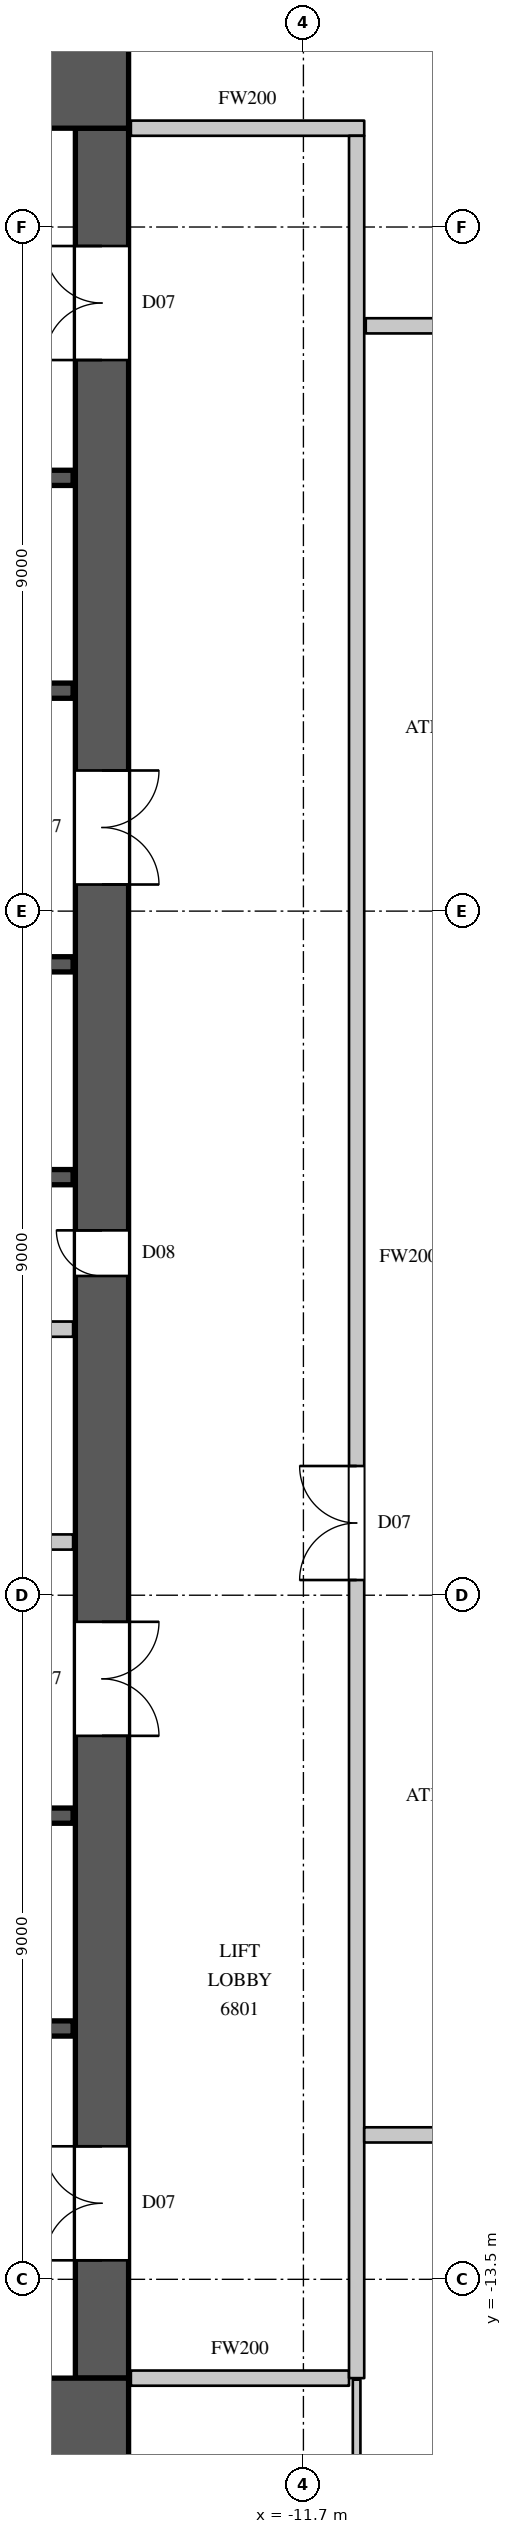
"""IFC4 building model, lengths in metres.
Left out: names, types, materials, properties, quantities, classifications, styles, units other than length and angle.
Written with IfcOpenShell. Run it as: python <this file> out.ifc"""

import sys

from ifc_helpers import new_model, si_unit, direction, frame, frame_2d, origin, place, context, subcontext, project, spatial, rectangle, extrude, element, fill, save


model = new_model("IFC4")
c1 = context("Model", 3, precision=1e-05, world=origin(), true_north=direction((0.0, 1.0)))
c2 = subcontext(c1, "Body", "Model", "MODEL_VIEW")
j1 = project(units=[si_unit("LENGTHUNIT", "METRE"), si_unit("PLANEANGLEUNIT", "RADIAN")], contexts=[c1])
p1 = place(None, origin())
s1 = spatial("IfcSite", under=j1, at=p1, CompositionType="ELEMENT")
p2 = place(p1, origin())
s2 = spatial("IfcBuilding", under=s1, at=p2, CompositionType="ELEMENT")
p3 = place(p2, frame((0.0, 0.0, 300.8)))
s3 = spatial("IfcBuildingStorey", under=s2, at=p3, CompositionType="ELEMENT", Elevation=300.8)
for number, where, z_axis, x_axis in (
    (1, (-30.0, 15.4, 0.0), (0.0, 0.0, 1.0), (1.0, 0.0, 0.0)),
    (2, (-30.0, -15.4, 0.0), (0.0, 0.0, 1.0), (1.0, 0.0, 0.0)),
):
    element("IfcWall", number, at=place(p3, frame(where, z_axis=z_axis, x_axis=x_axis)), inside=s3, PredefinedType="SHEAR", context=c2, shape_type="SweptSolid", body=[
        extrude(rectangle(XDim=16.0, YDim=1.2, at=frame_2d((8.0, 0.0))), origin(), (0.0, 0.0, 1.0), 4.1),
    ])
p4 = place(p3, frame((-14.35, -14.8, 0.0), z_axis=(0.0, 0.0, 1.0), x_axis=(0.0, 1.0, 0.0)))
e3 = element("IfcWall", 3, at=p4, inside=s3, PredefinedType="SHEAR", context=c2, shape_type="SweptSolid", body=[
    extrude(rectangle(XDim=29.6, YDim=0.7, at=frame_2d((14.8, 0.0))), origin(), (0.0, 0.0, 1.0), 4.1),
])
p5 = place(p4, frame((1.55, 0.0, 0.0)))
e4 = element("IfcOpeningElement", 4, at=p5, cuts=e3, PredefinedType="OPENING", context=c2, shape_type="SweptSolid", body=[
    extrude(rectangle(XDim=1.5, YDim=2.4, at=frame_2d((0.75, 1.2))), frame((0.0, 0.36, 0.0), z_axis=(0.0, -1.0, 0.0), x_axis=(1.0, 0.0, 0.0)), (0.0, 0.0, 1.0), 0.72),
])
p6 = place(p4, frame((26.55, 0.0, 0.0)))
e5 = element("IfcOpeningElement", 5, at=p6, cuts=e3, PredefinedType="OPENING", context=c2, shape_type="SweptSolid", body=[
    extrude(rectangle(XDim=1.5, YDim=2.4, at=frame_2d((0.75, 1.2))), frame((0.0, 0.36, 0.0), z_axis=(0.0, -1.0, 0.0), x_axis=(1.0, 0.0, 0.0)), (0.0, 0.0, 1.0), 0.72),
])
p7 = place(p4, frame((8.45, 0.0, 0.0)))
e6 = element("IfcOpeningElement", 6, at=p7, cuts=e3, PredefinedType="OPENING", context=c2, shape_type="SweptSolid", body=[
    extrude(rectangle(XDim=1.5, YDim=2.4, at=frame_2d((0.75, 1.2))), frame((0.0, 0.36, 0.0), z_axis=(0.0, -1.0, 0.0), x_axis=(1.0, 0.0, 0.0)), (0.0, 0.0, 1.0), 0.72),
])
p8 = place(p4, frame((19.65, 0.0, 0.0)))
e7 = element("IfcOpeningElement", 7, at=p8, cuts=e3, PredefinedType="OPENING", context=c2, shape_type="SweptSolid", body=[
    extrude(rectangle(XDim=1.5, YDim=2.4, at=frame_2d((0.75, 1.2))), frame((0.0, 0.36, 0.0), z_axis=(0.0, -1.0, 0.0), x_axis=(1.0, 0.0, 0.0)), (0.0, 0.0, 1.0), 0.72),
])
p9 = place(p4, frame((14.5, 0.0, 0.0)))
e8 = element("IfcOpeningElement", 8, at=p9, cuts=e3, PredefinedType="OPENING", context=c2, shape_type="SweptSolid", body=[
    extrude(rectangle(XDim=0.6, YDim=2.0, at=frame_2d((0.3, 1.0))), frame((0.0, 0.36, 0.0), z_axis=(0.0, -1.0, 0.0), x_axis=(1.0, 0.0, 0.0)), (0.0, 0.0, 1.0), 0.72),
])
p10 = place(p3, frame((-29.27, -3.8, 0.0), z_axis=(0.0, 0.0, 1.0), x_axis=(1.0, 0.0, 0.0)))
e9 = element("IfcWall", 9, at=p10, inside=s3, PredefinedType="PARTITIONING", context=c2, shape_type="SweptSolid", body=[
    extrude(rectangle(XDim=14.54, YDim=0.2, at=frame_2d((7.27, 0.0))), origin(), (0.0, 0.0, 1.0), 3.8),
])
p11 = place(p10, frame((3.25, 0.0, 0.0)))
e10 = element("IfcOpeningElement", 10, at=p11, cuts=e9, PredefinedType="OPENING", context=c2, shape_type="SweptSolid", body=[
    extrude(rectangle(XDim=0.9, YDim=2.2, at=frame_2d((0.45, 1.1))), frame((0.0, 0.11, 0.0), z_axis=(0.0, -1.0, 0.0), x_axis=(1.0, 0.0, 0.0)), (0.0, 0.0, 1.0), 0.22),
])
p12 = place(p10, frame((10.35, 0.0, 0.0)))
e11 = element("IfcOpeningElement", 11, at=p12, cuts=e9, PredefinedType="OPENING", context=c2, shape_type="SweptSolid", body=[
    extrude(rectangle(XDim=0.9, YDim=2.2, at=frame_2d((0.45, 1.1))), frame((0.0, 0.11, 0.0), z_axis=(0.0, -1.0, 0.0), x_axis=(1.0, 0.0, 0.0)), (0.0, 0.0, 1.0), 0.22),
])
p13 = place(p3, frame((-13.97, -14.8, 0.0), z_axis=(0.0, 0.0, 1.0), x_axis=(1.0, 0.0, 0.0)))
e12 = element("IfcWall", 12, at=p13, inside=s3, PredefinedType="PARTITIONING", context=c2, shape_type="SweptSolid", body=[
    extrude(rectangle(XDim=2.87, YDim=0.2, at=frame_2d((1.435, 0.0))), origin(), (0.0, 0.0, 1.0), 3.8),
])
p14 = place(p3, frame((-13.97, 14.8, 0.0), z_axis=(0.0, 0.0, 1.0), x_axis=(1.0, 0.0, 0.0)))
e13 = element("IfcWall", 13, at=p14, inside=s3, PredefinedType="PARTITIONING", context=c2, shape_type="SweptSolid", body=[
    extrude(rectangle(XDim=3.07, YDim=0.2, at=frame_2d((1.535, 0.0))), origin(), (0.0, 0.0, 1.0), 3.8),
])
p15 = place(p3, frame((-11.0, -14.8, 0.0), z_axis=(0.0, 0.0, 1.0), x_axis=(0.0, 1.0, 0.0)))
e14 = element("IfcWall", 14, at=p15, inside=s3, PredefinedType="PARTITIONING", context=c2, shape_type="SweptSolid", body=[
    extrude(rectangle(XDim=29.5, YDim=0.2, at=frame_2d((14.75, 0.0))), origin(), (0.0, 0.0, 1.0), 3.8),
])
p16 = place(p15, frame((10.5, 0.0, 0.0)))
e15 = element("IfcOpeningElement", 15, at=p16, cuts=e14, PredefinedType="OPENING", context=c2, shape_type="SweptSolid", body=[
    extrude(rectangle(XDim=1.5, YDim=2.4, at=frame_2d((0.75, 1.2))), frame((0.0, 0.11, 0.0), z_axis=(0.0, -1.0, 0.0), x_axis=(1.0, 0.0, 0.0)), (0.0, 0.0, 1.0), 0.22),
])
p17 = place(p3, frame((-10.9, -11.6, 0.0), z_axis=(0.0, 0.0, 1.0), x_axis=(1.0, 0.0, 0.0)))
e16 = element("IfcWall", 16, at=p17, inside=s3, PredefinedType="PARTITIONING", context=c2, shape_type="SweptSolid", body=[
    extrude(rectangle(XDim=13.421, YDim=0.2, at=frame_2d((6.71, 0.0))), origin(), (0.0, 0.0, 1.0), 3.8),
])
p18 = place(p17, frame((1.1, 0.0, 0.0)))
e17 = element("IfcOpeningElement", 17, at=p18, cuts=e16, PredefinedType="OPENING", context=c2, shape_type="SweptSolid", body=[
    extrude(rectangle(XDim=0.9, YDim=2.2, at=frame_2d((0.45, 1.1))), frame((0.0, 0.11, 0.0), z_axis=(0.0, -1.0, 0.0), x_axis=(1.0, 0.0, 0.0)), (0.0, 0.0, 1.0), 0.22),
])
p19 = place(p17, frame((4.9, 0.0, 0.0)))
e18 = element("IfcOpeningElement", 18, at=p19, cuts=e16, PredefinedType="OPENING", context=c2, shape_type="SweptSolid", body=[
    extrude(rectangle(XDim=0.9, YDim=2.2, at=frame_2d((0.45, 1.1))), frame((0.0, 0.11, 0.0), z_axis=(0.0, -1.0, 0.0), x_axis=(1.0, 0.0, 0.0)), (0.0, 0.0, 1.0), 0.22),
])
p20 = place(p17, frame((7.25, 0.0, 0.0)))
e19 = element("IfcOpeningElement", 19, at=p20, cuts=e16, PredefinedType="OPENING", context=c2, shape_type="SweptSolid", body=[
    extrude(rectangle(XDim=0.9, YDim=2.2, at=frame_2d((0.45, 1.1))), frame((0.0, 0.11, 0.0), z_axis=(0.0, -1.0, 0.0), x_axis=(1.0, 0.0, 0.0)), (0.0, 0.0, 1.0), 0.22),
])
p21 = place(p17, frame((9.9, 0.0, 0.0)))
e20 = element("IfcOpeningElement", 20, at=p21, cuts=e16, PredefinedType="OPENING", context=c2, shape_type="SweptSolid", body=[
    extrude(rectangle(XDim=1.1, YDim=2.4, at=frame_2d((0.55, 1.2))), frame((0.0, 0.11, 0.0), z_axis=(0.0, -1.0, 0.0), x_axis=(1.0, 0.0, 0.0)), (0.0, 0.0, 1.0), 0.22),
])
p22 = place(p3, frame((-10.88, 12.2, 0.0), z_axis=(0.0, 0.0, 1.0), x_axis=(1.0, 0.0, 0.0)))
e21 = element("IfcWall", 21, at=p22, inside=s3, PredefinedType="PARTITIONING", context=c2, shape_type="SweptSolid", body=[
    extrude(rectangle(XDim=3.736, YDim=0.2, at=frame_2d((1.868, 0.0))), origin(), (0.0, 0.0, 1.0), 3.8),
])
p23 = place(p22, frame((1.9, 0.0, 0.0)))
e22 = element("IfcOpeningElement", 22, at=p23, cuts=e21, PredefinedType="OPENING", context=c2, shape_type="SweptSolid", body=[
    extrude(rectangle(XDim=1.1, YDim=2.4, at=frame_2d((0.55, 1.2))), frame((0.0, 0.11, 0.0), z_axis=(0.0, -1.0, 0.0), x_axis=(1.0, 0.0, 0.0)), (0.0, 0.0, 1.0), 0.22),
])
p24 = place(p3, frame((-29.27, -1.0, 0.0), z_axis=(0.0, 0.0, 1.0), x_axis=(1.0, 0.0, 0.0)))
e23 = element("IfcWall", 23, at=p24, inside=s3, PredefinedType="PARTITIONING", context=c2, shape_type="SweptSolid", body=[
    extrude(rectangle(XDim=14.54, YDim=0.2, at=frame_2d((7.27, 0.0))), origin(), (0.0, 0.0, 1.0), 3.8),
])
p25 = place(p3, frame((-17.92, -10.2, 0.0), z_axis=(0.0, 0.0, 1.0), x_axis=(1.0, 0.0, 0.0)))
e24 = element("IfcWall", 24, at=p25, inside=s3, PredefinedType="SHEAR", context=c2, shape_type="SweptSolid", body=[
    extrude(rectangle(XDim=3.19, YDim=0.2, at=frame_2d((1.595, 0.0))), origin(), (0.0, 0.0, 1.0), 3.8),
])
p26 = place(p25, frame((1.05, 0.0, 0.0)))
e25 = element("IfcOpeningElement", 25, at=p26, cuts=e24, PredefinedType="OPENING", context=c2, shape_type="SweptSolid", body=[
    extrude(rectangle(XDim=1.1, YDim=2.2, at=frame_2d((0.55, 1.1))), frame((0.0, 0.11, 0.0), z_axis=(0.0, -1.0, 0.0), x_axis=(1.0, 0.0, 0.0)), (0.0, 0.0, 1.0), 0.22),
])
p27 = place(p3, frame((-17.92, -7.4, 0.0), z_axis=(0.0, 0.0, 1.0), x_axis=(1.0, 0.0, 0.0)))
e26 = element("IfcWall", 26, at=p27, inside=s3, PredefinedType="SHEAR", context=c2, shape_type="SweptSolid", body=[
    extrude(rectangle(XDim=3.19, YDim=0.2, at=frame_2d((1.595, 0.0))), origin(), (0.0, 0.0, 1.0), 3.8),
])
p28 = place(p3, frame((-17.9, 1.0, 0.0), z_axis=(0.0, 0.0, 1.0), x_axis=(1.0, 0.0, 0.0)))
e27 = element("IfcWall", 27, at=p28, inside=s3, PredefinedType="SHEAR", context=c2, shape_type="SweptSolid", body=[
    extrude(rectangle(XDim=3.17, YDim=0.2, at=frame_2d((1.585, 0.0))), origin(), (0.0, 0.0, 1.0), 3.8),
])
p29 = place(p3, frame((-17.9, 3.8, 0.0), z_axis=(0.0, 0.0, 1.0), x_axis=(1.0, 0.0, 0.0)))
e28 = element("IfcWall", 28, at=p29, inside=s3, PredefinedType="SHEAR", context=c2, shape_type="SweptSolid", body=[
    extrude(rectangle(XDim=3.17, YDim=0.2, at=frame_2d((1.585, 0.0))), origin(), (0.0, 0.0, 1.0), 3.8),
])
p30 = place(p29, frame((1.05, 0.0, 0.0)))
e29 = element("IfcOpeningElement", 29, at=p30, cuts=e28, PredefinedType="OPENING", context=c2, shape_type="SweptSolid", body=[
    extrude(rectangle(XDim=1.1, YDim=2.2, at=frame_2d((0.55, 1.1))), frame((0.0, 0.11, 0.0), z_axis=(0.0, -1.0, 0.0), x_axis=(1.0, 0.0, 0.0)), (0.0, 0.0, 1.0), 0.22),
])
p31 = place(p3, frame((-17.92, 7.4, 0.0), z_axis=(0.0, 0.0, 1.0), x_axis=(1.0, 0.0, 0.0)))
e30 = element("IfcWall", 30, at=p31, inside=s3, PredefinedType="SHEAR", context=c2, shape_type="SweptSolid", body=[
    extrude(rectangle(XDim=3.19, YDim=0.2, at=frame_2d((1.595, 0.0))), origin(), (0.0, 0.0, 1.0), 3.8),
])
p32 = place(p3, frame((-17.92, 10.2, 0.0), z_axis=(0.0, 0.0, 1.0), x_axis=(1.0, 0.0, 0.0)))
e31 = element("IfcWall", 31, at=p32, inside=s3, PredefinedType="SHEAR", context=c2, shape_type="SweptSolid", body=[
    extrude(rectangle(XDim=3.19, YDim=0.2, at=frame_2d((1.595, 0.0))), origin(), (0.0, 0.0, 1.0), 3.8),
])
p33 = place(p32, frame((1.05, 0.0, 0.0)))
e32 = element("IfcOpeningElement", 32, at=p33, cuts=e31, PredefinedType="OPENING", context=c2, shape_type="SweptSolid", body=[
    extrude(rectangle(XDim=1.1, YDim=2.2, at=frame_2d((0.55, 1.1))), frame((0.0, 0.11, 0.0), z_axis=(0.0, -1.0, 0.0), x_axis=(1.0, 0.0, 0.0)), (0.0, 0.0, 1.0), 0.22),
])
p34 = place(p3, frame((-11.0, -23.757, 0.0), z_axis=(0.0, 0.0, 1.0), x_axis=(0.0, 1.0, 0.0)))
e33 = element("IfcWall", 33, at=p34, inside=s3, PredefinedType="PARTITIONING", context=c2, shape_type="SweptSolid", body=[
    extrude(rectangle(XDim=8.937, YDim=0.1, at=frame_2d((4.468, 0.0))), origin(), (0.0, 0.0, 1.0), 3.8),
])
p35 = place(p16, origin())
e34 = element("IfcDoor", 34, at=p35, inside=s3, OperationType="DOUBLE_DOOR_SINGLE_SWING", PredefinedType="DOOR", context=c2, shape_type="SweptSolid", body=[
    extrude(rectangle(XDim=1.5, YDim=2.4, at=frame_2d((0.75, 1.2))), frame((0.0, 0.025, 0.0), z_axis=(0.0, -1.0, 0.0), x_axis=(1.0, 0.0, 0.0)), (0.0, 0.0, 1.0), 0.05),
])
fill(e15, e34)
p36 = place(p5, origin())
e35 = element("IfcDoor", 35, at=p36, inside=s3, OperationType="DOUBLE_DOOR_SINGLE_SWING", PredefinedType="DOOR", context=c2, shape_type="SweptSolid", body=[
    extrude(rectangle(XDim=1.5, YDim=2.4, at=frame_2d((0.75, 1.2))), frame((0.0, 0.345, 0.0), z_axis=(0.0, -1.0, 0.0), x_axis=(1.0, 0.0, 0.0)), (0.0, 0.0, 1.0), 0.05),
])
fill(e4, e35)
p37 = place(p6, origin())
e36 = element("IfcDoor", 36, at=p37, inside=s3, OperationType="DOUBLE_DOOR_SINGLE_SWING", PredefinedType="DOOR", context=c2, shape_type="SweptSolid", body=[
    extrude(rectangle(XDim=1.5, YDim=2.4, at=frame_2d((0.75, 1.2))), frame((0.0, 0.345, 0.0), z_axis=(0.0, -1.0, 0.0), x_axis=(1.0, 0.0, 0.0)), (0.0, 0.0, 1.0), 0.05),
])
fill(e5, e36)
p38 = place(p7, origin())
e37 = element("IfcDoor", 37, at=p38, inside=s3, OperationType="DOUBLE_DOOR_SINGLE_SWING", PredefinedType="DOOR", context=c2, shape_type="SweptSolid", body=[
    extrude(rectangle(XDim=1.5, YDim=2.4, at=frame_2d((0.75, 1.2))), frame((0.0, -0.295, 0.0), z_axis=(0.0, -1.0, 0.0), x_axis=(1.0, 0.0, 0.0)), (0.0, 0.0, 1.0), 0.05),
])
fill(e6, e37)
p39 = place(p8, origin())
e38 = element("IfcDoor", 38, at=p39, inside=s3, OperationType="DOUBLE_DOOR_SINGLE_SWING", PredefinedType="DOOR", context=c2, shape_type="SweptSolid", body=[
    extrude(rectangle(XDim=1.5, YDim=2.4, at=frame_2d((0.75, 1.2))), frame((0.0, -0.295, 0.0), z_axis=(0.0, -1.0, 0.0), x_axis=(1.0, 0.0, 0.0)), (0.0, 0.0, 1.0), 0.05),
])
fill(e7, e38)
p40 = place(p9, origin())
e39 = element("IfcDoor", 39, at=p40, inside=s3, OperationType="SINGLE_SWING_RIGHT", PredefinedType="DOOR", context=c2, shape_type="SweptSolid", body=[
    extrude(rectangle(XDim=0.6, YDim=2.0, at=frame_2d((0.3, 1.0))), frame((0.0, 0.345, 0.0), z_axis=(0.0, -1.0, 0.0), x_axis=(1.0, 0.0, 0.0)), (0.0, 0.0, 1.0), 0.05),
])
fill(e8, e39)
save(model, sys.argv[1])
